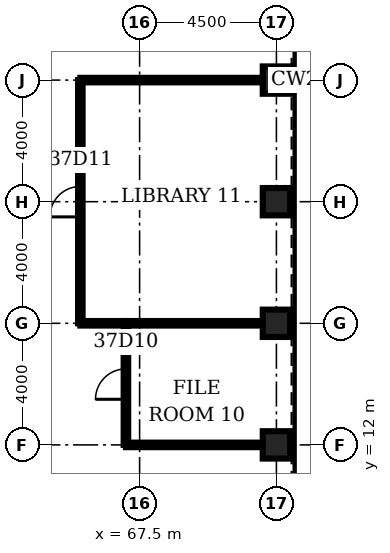
"""IFC4 building model, lengths in metres.
Left out: names, types, materials, properties, quantities, classifications, styles, units other than length and angle.
Written with IfcOpenShell. Run it as: python <this file> out.ifc"""

import sys

from ifc_helpers import new_model, si_unit, direction, frame, frame_2d, origin, origin_2d, place, context, subcontext, project, spatial, rectangle, hollow_rectangle, extrude, element, fill, save


model = new_model("IFC4")
c1 = context("Model", 3, precision=1e-05, world=origin(), true_north=direction((0.0, 1.0)))
c2 = subcontext(c1, "Body", "Model", "MODEL_VIEW")
j1 = project(units=[si_unit("LENGTHUNIT", "METRE"), si_unit("PLANEANGLEUNIT", "RADIAN")], contexts=[c1])
p1 = place(None, origin())
s1 = spatial("IfcSite", under=j1, at=p1, CompositionType="ELEMENT")
p2 = place(p1, origin())
s2 = spatial("IfcBuilding", under=s1, at=p2, CompositionType="ELEMENT")
p3 = place(p2, frame((0.0, 0.0, 167.7)))
s3 = spatial("IfcBuildingStorey", under=s2, at=p3, CompositionType="ELEMENT", Elevation=167.7)
for number, where, z_axis, x_axis in (
    (1, (72.0, 12.0, 0.0), (0.0, 0.0, 1.0), (1.0, 0.0, 0.0)),
    (2, (72.0, 16.0, 0.0), (0.0, 0.0, 1.0), (1.0, 0.0, 0.0)),
    (3, (72.0, 20.0, 0.0), (0.0, 0.0, 1.0), (1.0, 0.0, 0.0)),
    (4, (72.0, 24.0, 0.0), (0.0, 0.0, 1.0), (1.0, 0.0, 0.0)),
):
    element("IfcColumn", number, at=place(p3, frame(where, z_axis=z_axis, x_axis=x_axis)), inside=s3, PredefinedType="COLUMN", context=c2, shape_type="SweptSolid", body=[
        extrude(hollow_rectangle(XDim=0.9, YDim=0.9, WallThickness=0.09, at=origin_2d()), origin(), (0.0, 0.0, 1.0), 4.2),
    ])
p4 = place(p3, frame((67.05, 12.0, 0.0), z_axis=(0.0, 0.0, 1.0), x_axis=(1.0, 0.0, 0.0)))
e5 = element("IfcWall", 5, at=p4, inside=s3, PredefinedType="PARTITIONING", context=c2, shape_type="SweptSolid", body=[
    extrude(rectangle(XDim=4.5, YDim=0.15, at=frame_2d((2.25, 0.0))), origin(), (0.0, 0.0, 1.0), 3.0),
])
p5 = place(p3, frame((65.55, 16.0, 0.0), z_axis=(0.0, 0.0, 1.0), x_axis=(1.0, 0.0, 0.0)))
e6 = element("IfcWall", 6, at=p5, inside=s3, PredefinedType="PARTITIONING", context=c2, shape_type="SweptSolid", body=[
    extrude(rectangle(XDim=1.5, YDim=0.15, at=frame_2d((0.75, 0.0))), origin(), (0.0, 0.0, 1.0), 3.0),
])
p6 = place(p3, frame((67.05, 16.0, 0.0), z_axis=(0.0, 0.0, 1.0), x_axis=(1.0, 0.0, 0.0)))
e7 = element("IfcWall", 7, at=p6, inside=s3, PredefinedType="PARTITIONING", context=c2, shape_type="SweptSolid", body=[
    extrude(rectangle(XDim=4.5, YDim=0.15, at=frame_2d((2.25, 0.0))), origin(), (0.0, 0.0, 1.0), 3.0),
])
p7 = place(p3, frame((65.55, 24.0, 0.0), z_axis=(0.0, 0.0, 1.0), x_axis=(1.0, 0.0, 0.0)))
e8 = element("IfcWall", 8, at=p7, inside=s3, PredefinedType="PARTITIONING", context=c2, shape_type="SweptSolid", body=[
    extrude(rectangle(XDim=6.0, YDim=0.15, at=frame_2d((3.0, 0.0))), origin(), (0.0, 0.0, 1.0), 3.0),
])
p8 = place(p3, frame((65.55, 16.0, 0.0), z_axis=(0.0, 0.0, 1.0), x_axis=(0.0, 1.0, 0.0)))
e9 = element("IfcWall", 9, at=p8, inside=s3, PredefinedType="PARTITIONING", context=c2, shape_type="SweptSolid", body=[
    extrude(rectangle(XDim=8.0, YDim=0.15, at=frame_2d((4.0, 0.0))), origin(), (0.0, 0.0, 1.0), 3.0),
])
p9 = place(p8, frame((3.5, 0.0, 0.0)))
e10 = element("IfcOpeningElement", 10, at=p9, cuts=e9, PredefinedType="OPENING", context=c2, shape_type="SweptSolid", body=[
    extrude(rectangle(XDim=1.0, YDim=2.1, at=frame_2d((0.5, 1.05))), frame((0.0, 0.085, 0.0), z_axis=(0.0, -1.0, 0.0), x_axis=(1.0, 0.0, 0.0)), (0.0, 0.0, 1.0), 0.17),
])
p10 = place(p3, frame((67.05, 12.0, 0.0), z_axis=(0.0, 0.0, 1.0), x_axis=(0.0, 1.0, 0.0)))
e11 = element("IfcWall", 11, at=p10, inside=s3, PredefinedType="PARTITIONING", context=c2, shape_type="SweptSolid", body=[
    extrude(rectangle(XDim=4.0, YDim=0.15, at=frame_2d((2.0, 0.0))), origin(), (0.0, 0.0, 1.0), 3.0),
])
p11 = place(p10, frame((1.5, 0.0, 0.0)))
e12 = element("IfcOpeningElement", 12, at=p11, cuts=e11, PredefinedType="OPENING", context=c2, shape_type="SweptSolid", body=[
    extrude(rectangle(XDim=1.0, YDim=2.1, at=frame_2d((0.5, 1.05))), frame((0.0, 0.085, 0.0), z_axis=(0.0, -1.0, 0.0), x_axis=(1.0, 0.0, 0.0)), (0.0, 0.0, 1.0), 0.17),
])
p12 = place(p11, origin())
e13 = element("IfcDoor", 13, at=p12, inside=s3, OperationType="SINGLE_SWING_LEFT", PredefinedType="DOOR", context=c2, shape_type="SweptSolid", body=[
    extrude(rectangle(XDim=1.0, YDim=2.1, at=frame_2d((0.5, 1.05))), frame((0.0, 0.025, 0.0), z_axis=(0.0, -1.0, 0.0), x_axis=(1.0, 0.0, 0.0)), (0.0, 0.0, 1.0), 0.05),
])
fill(e12, e13)
p13 = place(p9, origin())
e14 = element("IfcDoor", 14, at=p13, inside=s3, OperationType="SINGLE_SWING_LEFT", PredefinedType="DOOR", context=c2, shape_type="SweptSolid", body=[
    extrude(rectangle(XDim=1.0, YDim=2.1, at=frame_2d((0.5, 1.05))), frame((0.0, 0.025, 0.0), z_axis=(0.0, -1.0, 0.0), x_axis=(1.0, 0.0, 0.0)), (0.0, 0.0, 1.0), 0.05),
])
fill(e10, e14)
save(model, sys.argv[1])
